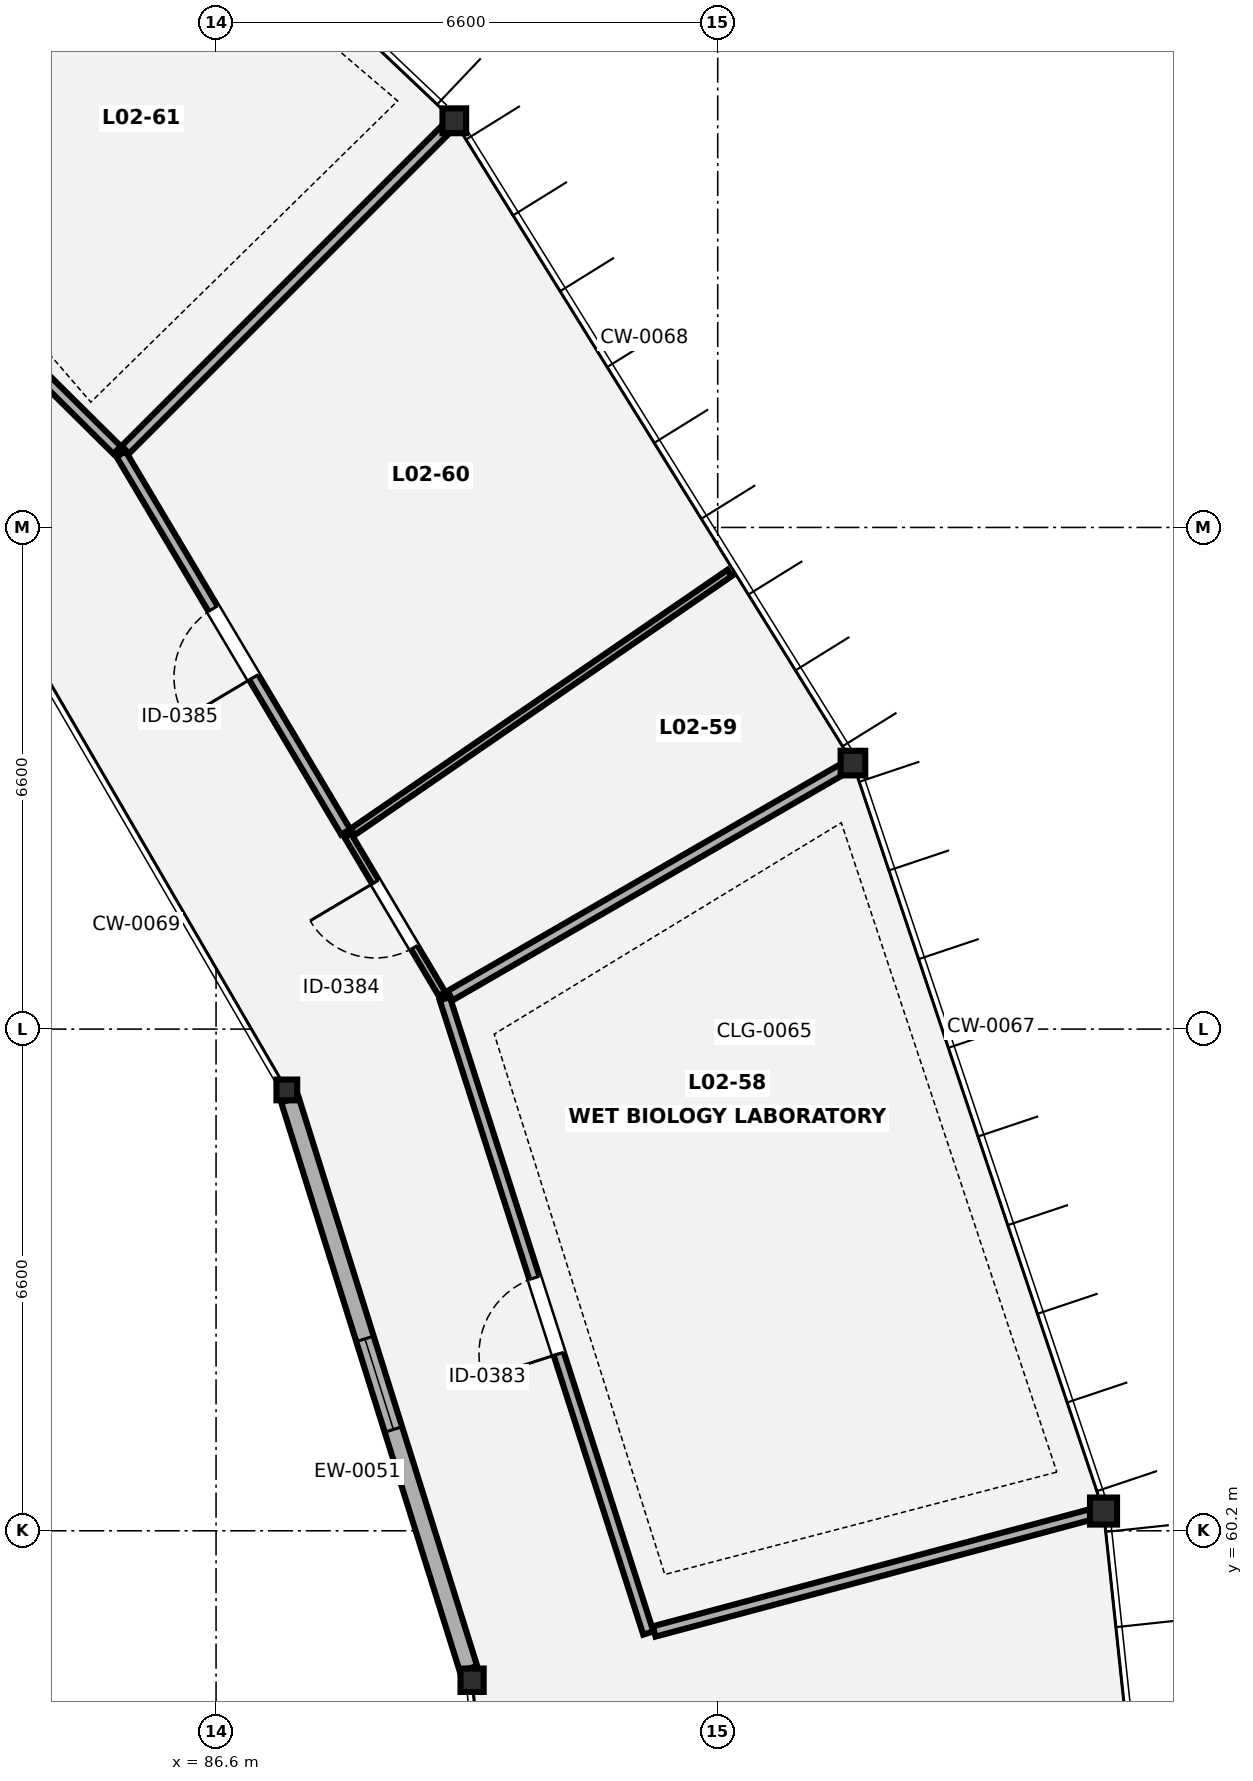
"""IFC4 building model, lengths in metres.
Left out: names, types, materials, properties, quantities, classifications, styles, units other than length and angle.
Written with IfcOpenShell. Run it as: python <this file> out.ifc"""

import sys

from ifc_helpers import new_model, si_unit, direction, frame, frame_2d, origin, origin_2d, place, context, subcontext, project, spatial, rectangle, hollow_circle, i_section, extrude, element, fill, save


model = new_model("IFC4")
c1 = context("Model", 3, precision=1e-05, world=origin(), true_north=direction((0.0, 1.0)))
c2 = subcontext(c1, "Body", "Model", "MODEL_VIEW")
j1 = project(units=[si_unit("LENGTHUNIT", "METRE"), si_unit("PLANEANGLEUNIT", "RADIAN")], contexts=[c1])
p1 = place(None, origin())
s1 = spatial("IfcSite", under=j1, at=p1, CompositionType="ELEMENT")
p2 = place(p1, origin())
s2 = spatial("IfcBuilding", under=s1, at=p2, CompositionType="ELEMENT")
p3 = place(p2, frame((0.0, 0.0, 9.1)))
s3 = spatial("IfcBuildingStorey", under=s2, at=p3, CompositionType="ELEMENT", Elevation=9.1)
p4 = place(p3, frame((98.276, 60.46, 0.0), z_axis=(0.0, 0.0, 1.0), x_axis=(1.0, 0.0, 0.0)))
e1 = element("IfcColumn", 1, at=p4, inside=s3, PredefinedType="COLUMN", context=c2, shape_type="SweptSolid", body=[
    extrude(hollow_circle(Radius=0.178, WallThickness=0.013, at=origin_2d()), origin(), (0.0, 0.0, 1.0), 4.2),
])
p5 = place(p3, frame((89.969, 58.234, 0.0), z_axis=(0.0, 0.0, 1.0), x_axis=(1.0, 0.0, 0.0)))
e2 = element("IfcColumn", 2, at=p5, inside=s3, PredefinedType="COLUMN", context=c2, shape_type="SweptSolid", body=[
    extrude(i_section(OverallWidth=0.305, OverallDepth=0.308, WebThickness=0.01, FlangeThickness=0.015, FilletRadius=0.017, at=origin_2d()), origin(), (0.0, 0.0, 1.0), 4.2),
])
p6 = place(p3, frame((94.979, 70.3, 0.0), z_axis=(0.0, 0.0, 1.0), x_axis=(1.0, 0.0, 0.0)))
e3 = element("IfcColumn", 3, at=p6, inside=s3, PredefinedType="COLUMN", context=c2, shape_type="SweptSolid", body=[
    extrude(hollow_circle(Radius=0.162, WallThickness=0.013, at=origin_2d()), origin(), (0.0, 0.0, 1.0), 4.2),
])
p7 = place(p3, frame((87.531, 66.0, 0.0), z_axis=(0.0, 0.0, 1.0), x_axis=(1.0, 0.0, 0.0)))
e4 = element("IfcColumn", 4, at=p7, inside=s3, PredefinedType="COLUMN", context=c2, shape_type="SweptSolid", body=[
    extrude(hollow_circle(Radius=0.136, WallThickness=0.009, at=origin_2d()), origin(), (0.0, 0.0, 1.0), 4.2),
])
p8 = place(p3, frame((89.735, 78.75, 0.0), z_axis=(0.0, 0.0, 1.0), x_axis=(1.0, 0.0, 0.0)))
e5 = element("IfcColumn", 5, at=p8, inside=s3, PredefinedType="COLUMN", context=c2, shape_type="SweptSolid", body=[
    extrude(i_section(OverallWidth=0.311, OverallDepth=0.327, WebThickness=0.016, FlangeThickness=0.025, FilletRadius=0.017, at=origin_2d()), origin(), (0.0, 0.0, 1.0), 4.2),
])
p9 = place(p3, frame((89.921, 58.386, 0.0), z_axis=(0.0, 0.0, 1.0), x_axis=(-0.299477830639, 0.954103259064, 0.0)))
e6 = element("IfcWall", 6, at=p9, inside=s3, PredefinedType="SOLIDWALL", context=c2, shape_type="SweptSolid", body=[
    extrude(rectangle(XDim=7.846, YDim=0.24, at=frame_2d((3.923, 0.0))), origin(), (0.0, 0.0, 1.0), 3.65),
])
p10 = place(p9, frame((3.298, 0.0, 0.85)))
e7 = element("IfcOpeningElement", 7, at=p10, cuts=e6, PredefinedType="OPENING", context=c2, shape_type="SweptSolid", body=[
    extrude(rectangle(XDim=1.25, YDim=1.4, at=frame_2d((0.625, 0.7))), frame((0.0, 0.13, 0.0), z_axis=(0.0, -1.0, 0.0), x_axis=(1.0, 0.0, 0.0)), (0.0, 0.0, 1.0), 0.26),
])
p11 = place(p3, frame((92.287, 58.855, 0.0), z_axis=(0.0, 0.0, 1.0), x_axis=(-0.30548522006, 0.952196818061, 0.0)))
e8 = element("IfcWall", 8, at=p11, inside=s3, PredefinedType="PARTITIONING", context=c2, shape_type="SweptSolid", body=[
    extrude(rectangle(XDim=8.764, YDim=0.14, at=frame_2d((4.382, 0.0))), origin(), (0.0, 0.0, 1.0), 4.0),
])
p12 = place(p11, frame((3.857, 0.0, 0.0)))
e9 = element("IfcOpeningElement", 9, at=p12, cuts=e8, PredefinedType="OPENING", context=c2, shape_type="SweptSolid", body=[
    extrude(rectangle(XDim=1.05, YDim=2.15, at=frame_2d((0.525, 1.075))), frame((0.0, 0.08, 0.0), z_axis=(0.0, -1.0, 0.0), x_axis=(1.0, 0.0, 0.0)), (0.0, 0.0, 1.0), 0.16),
])
p13 = place(p3, frame((92.364, 58.876, 0.0), z_axis=(0.0, 0.0, 1.0), x_axis=(0.96591927772, 0.258843483457, 0.0)))
e10 = element("IfcWall", 10, at=p13, inside=s3, PredefinedType="PARTITIONING", context=c2, shape_type="SweptSolid", body=[
    extrude(rectangle(XDim=6.06, YDim=0.14, at=frame_2d((3.03, 0.0))), origin(), (0.0, 0.0, 1.0), 3.323),
])
p14 = place(p3, frame((89.679, 67.24, 0.0), z_axis=(0.0, 0.0, 1.0), x_axis=(0.866020543329, 0.500008418462, 0.0)))
e11 = element("IfcWall", 11, at=p14, inside=s3, PredefinedType="PARTITIONING", context=c2, shape_type="SweptSolid", body=[
    extrude(rectangle(XDim=6.06, YDim=0.14, at=frame_2d((3.03, 0.0))), origin(), (0.0, 0.0, 1.0), 3.392),
])
p15 = place(p3, frame((89.573, 67.262, 0.0), z_axis=(0.0, 0.0, 1.0), x_axis=(-0.510928867953, 0.859622994046, 0.0)))
e12 = element("IfcWall", 12, at=p15, inside=s3, PredefinedType="PARTITIONING", context=c2, shape_type="SweptSolid", body=[
    extrude(rectangle(XDim=2.429, YDim=0.1, at=frame_2d((1.214, 0.0))), origin(), (0.0, 0.0, 1.0), 4.0),
])
p16 = place(p15, frame((0.714, 0.0, 0.0)))
e13 = element("IfcOpeningElement", 13, at=p16, cuts=e12, PredefinedType="OPENING", context=c2, shape_type="SweptSolid", body=[
    extrude(rectangle(XDim=1.0, YDim=2.1, at=frame_2d((0.5, 1.05))), frame((0.0, 0.06, 0.0), z_axis=(0.0, -1.0, 0.0), x_axis=(1.0, 0.0, 0.0)), (0.0, 0.0, 1.0), 0.12),
])
p17 = place(p3, frame((88.398, 69.395, 0.0), z_axis=(0.0, 0.0, 1.0), x_axis=(0.824271584206, 0.566194626847, 0.0)))
e14 = element("IfcWall", 14, at=p17, inside=s3, PredefinedType="PARTITIONING", context=c2, shape_type="SweptSolid", body=[
    extrude(rectangle(XDim=6.016, YDim=0.1, at=frame_2d((3.008, 0.0))), origin(), (0.0, 0.0, 1.0), 4.0),
])
p18 = place(p3, frame((88.305, 69.395, 0.0), z_axis=(0.0, 0.0, 1.0), x_axis=(-0.510896676259, 0.859642126811, 0.0)))
e15 = element("IfcWall", 15, at=p18, inside=s3, PredefinedType="PARTITIONING", context=c2, shape_type="SweptSolid", body=[
    extrude(rectangle(XDim=5.783, YDim=0.14, at=frame_2d((2.892, 0.0))), origin(), (0.0, 0.0, 1.0), 4.0),
])
p19 = place(p18, frame((2.366, 0.0, 0.0)))
e16 = element("IfcOpeningElement", 16, at=p19, cuts=e15, PredefinedType="OPENING", context=c2, shape_type="SweptSolid", body=[
    extrude(rectangle(XDim=1.05, YDim=2.15, at=frame_2d((0.525, 1.075))), frame((0.0, 0.08, 0.0), z_axis=(0.0, -1.0, 0.0), x_axis=(1.0, 0.0, 0.0)), (0.0, 0.0, 1.0), 0.16),
])
p20 = place(p3, frame((85.407, 74.423, 0.0), z_axis=(0.0, 0.0, 1.0), x_axis=(0.70712692467, 0.707086637129, 0.0)))
e17 = element("IfcWall", 17, at=p20, inside=s3, PredefinedType="PARTITIONING", context=c2, shape_type="SweptSolid", body=[
    extrude(rectangle(XDim=6.06, YDim=0.14, at=frame_2d((3.03, 0.0))), origin(), (0.0, 0.0, 1.0), 3.392),
])
p21 = place(p3, frame((85.299, 74.417, 0.0), z_axis=(0.0, 0.0, 1.0), x_axis=(-0.710410596589, 0.703787456732, 0.0)))
e18 = element("IfcWall", 18, at=p21, inside=s3, PredefinedType="PARTITIONING", context=c2, shape_type="SweptSolid", body=[
    extrude(rectangle(XDim=7.741, YDim=0.14, at=frame_2d((3.871, 0.0))), origin(), (0.0, 0.0, 1.0), 4.0),
])
p22 = place(p21, frame((3.121, 0.0, 0.0)))
e19 = element("IfcOpeningElement", 19, at=p22, cuts=e18, PredefinedType="OPENING", context=c2, shape_type="SweptSolid", body=[
    extrude(rectangle(XDim=1.5, YDim=2.15, at=frame_2d((0.75, 1.075))), frame((0.0, 0.08, 0.0), z_axis=(0.0, -1.0, 0.0), x_axis=(1.0, 0.0, 0.0)), (0.0, 0.0, 1.0), 0.16),
])
p23 = place(p10, origin())
e20 = element("IfcWindow", 20, at=p23, inside=s3, PartitioningType="SINGLE_PANEL", PredefinedType="WINDOW", context=c2, shape_type="SweptSolid", body=[
    extrude(rectangle(XDim=1.25, YDim=1.4, at=frame_2d((0.625, 0.7))), frame((0.0, 0.03, 0.0), z_axis=(0.0, -1.0, 0.0), x_axis=(1.0, 0.0, 0.0)), (0.0, 0.0, 1.0), 0.06),
])
fill(e7, e20)
p24 = place(p12, origin())
e21 = element("IfcDoor", 21, at=p24, inside=s3, OperationType="SINGLE_SWING_LEFT", PredefinedType="DOOR", context=c2, shape_type="SweptSolid", body=[
    extrude(rectangle(XDim=1.05, YDim=2.15, at=frame_2d((0.525, 1.075))), frame((0.0, 0.025, 0.0), z_axis=(0.0, -1.0, 0.0), x_axis=(1.0, 0.0, 0.0)), (0.0, 0.0, 1.0), 0.05),
])
fill(e9, e21)
p25 = place(p16, origin())
e22 = element("IfcDoor", 22, at=p25, inside=s3, OperationType="SINGLE_SWING_RIGHT", PredefinedType="DOOR", context=c2, shape_type="SweptSolid", body=[
    extrude(rectangle(XDim=1.0, YDim=2.1, at=frame_2d((0.5, 1.05))), frame((0.0, 0.025, 0.0), z_axis=(0.0, -1.0, 0.0), x_axis=(1.0, 0.0, 0.0)), (0.0, 0.0, 1.0), 0.05),
])
fill(e13, e22)
p26 = place(p19, origin())
e23 = element("IfcDoor", 23, at=p26, inside=s3, OperationType="SINGLE_SWING_LEFT", PredefinedType="DOOR", context=c2, shape_type="SweptSolid", body=[
    extrude(rectangle(XDim=1.05, YDim=2.15, at=frame_2d((0.525, 1.075))), frame((0.0, 0.025, 0.0), z_axis=(0.0, -1.0, 0.0), x_axis=(1.0, 0.0, 0.0)), (0.0, 0.0, 1.0), 0.05),
])
fill(e16, e23)
save(model, sys.argv[1])
